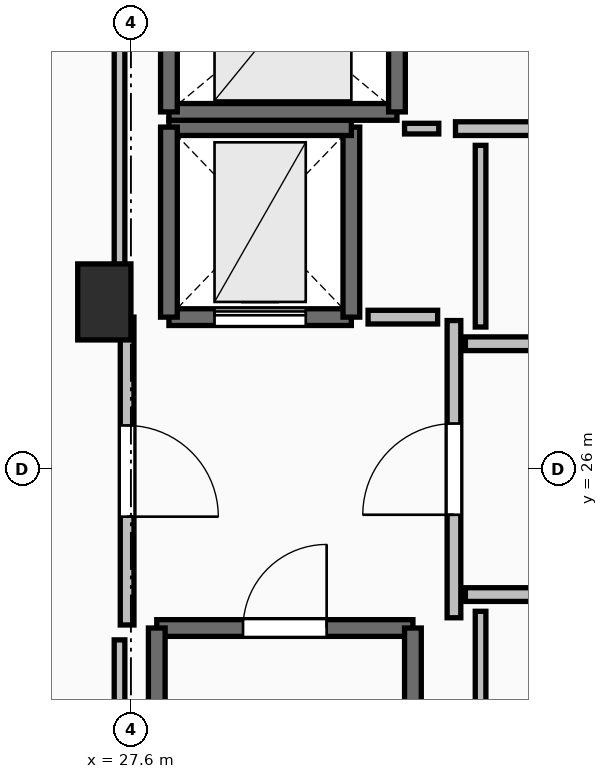
"""IFC4 building model, lengths in metres.
Left out: names, types, materials, properties, quantities, classifications, styles, units other than length and angle.
Written with IfcOpenShell. Run it as: python <this file> out.ifc"""

import sys

from ifc_helpers import new_model, si_unit, direction, frame, frame_2d, origin, origin_2d, place, context, subcontext, project, spatial, rectangle, extrude, element, fill, save


model = new_model("IFC4")
c1 = context("Model", 3, precision=1e-05, world=origin(), true_north=direction((0.0, 1.0)))
c2 = subcontext(c1, "Body", "Model", "MODEL_VIEW")
j1 = project(units=[si_unit("LENGTHUNIT", "METRE"), si_unit("PLANEANGLEUNIT", "RADIAN")], contexts=[c1])
p1 = place(None, origin())
s1 = spatial("IfcSite", under=j1, at=p1, CompositionType="ELEMENT")
p2 = place(p1, origin())
s2 = spatial("IfcBuilding", under=s1, at=p2, CompositionType="ELEMENT")
p3 = place(p2, frame((0.0, 0.0, 266.2)))
s3 = spatial("IfcBuildingStorey", under=s2, at=p3, CompositionType="ELEMENT", Elevation=266.2)
p4 = place(p3, frame((27.25, 28.2, 0.0), z_axis=(0.0, 0.0, 1.0), x_axis=(1.0, 0.0, 0.0)))
e1 = element("IfcColumn", 1, at=p4, inside=s3, PredefinedType="PILASTER", context=c2, shape_type="SweptSolid", body=[
    extrude(rectangle(XDim=0.7, YDim=1.0, at=origin_2d()), origin(), (0.0, 0.0, 1.0), 3.55),
])
p5 = place(p3, frame((27.94, 23.91, 0.0), z_axis=(0.0, 0.0, 1.0), x_axis=(1.0, 0.0, 0.0)))
e2 = element("IfcWall", 2, at=p5, inside=s3, PredefinedType="SOLIDWALL", context=c2, shape_type="SweptSolid", body=[
    extrude(rectangle(XDim=3.37, YDim=0.22, at=frame_2d((1.685, 0.0))), origin(), (0.0, 0.0, 1.0), 3.29),
])
p6 = place(p5, frame((1.135, 0.0, 0.0)))
e3 = element("IfcOpeningElement", 3, at=p6, cuts=e2, PredefinedType="OPENING", context=c2, shape_type="SweptSolid", body=[
    extrude(rectangle(XDim=1.1, YDim=2.15, at=frame_2d((0.55, 1.075))), frame((0.0, 0.125, 0.0), z_axis=(0.0, -1.0, 0.0), x_axis=(1.0, 0.0, 0.0)), (0.0, 0.0, 1.0), 0.25),
])
for number, where, z_axis, x_axis in (
    (4, (31.31, 23.91, 0.0), (0.0, 0.0, 1.0), (0.0, -1.0, 0.0)),
    (5, (27.94, 16.49, 0.0), (0.0, 0.0, 1.0), (0.0, 1.0, 0.0)),
):
    element("IfcWall", number, at=place(p3, frame(where, z_axis=z_axis, x_axis=x_axis)), inside=s3, PredefinedType="SOLIDWALL", context=c2, shape_type="SweptSolid", body=[
        extrude(rectangle(XDim=7.42, YDim=0.22, at=frame_2d((3.71, 0.0))), origin(), (0.0, 0.0, 1.0), 3.29),
    ])
p7 = place(p3, frame((28.1, 28.0, 0.0), z_axis=(0.0, 0.0, 1.0), x_axis=(1.0, 0.0, 0.0)))
e6 = element("IfcWall", 6, at=p7, inside=s3, PredefinedType="SHEAR", context=c2, shape_type="SweptSolid", body=[
    extrude(rectangle(XDim=2.4, YDim=0.22, at=frame_2d((1.2, 0.0))), origin(), (0.0, 0.0, 1.0), 3.29),
])
p8 = place(p7, frame((0.6, 0.0, 0.0)))
e7 = element("IfcOpeningElement", 7, at=p8, cuts=e6, PredefinedType="OPENING", context=c2, shape_type="SweptSolid", body=[
    extrude(rectangle(XDim=1.2, YDim=2.2, at=frame_2d((0.6, 1.1))), frame((0.0, 0.125, 0.0), z_axis=(0.0, -1.0, 0.0), x_axis=(1.0, 0.0, 0.0)), (0.0, 0.0, 1.0), 0.25),
])
p9 = place(p3, frame((30.5, 28.0, 0.0), z_axis=(0.0, 0.0, 1.0), x_axis=(0.0, 1.0, 0.0)))
e8 = element("IfcWall", 8, at=p9, inside=s3, PredefinedType="SHEAR", context=c2, shape_type="SweptSolid", body=[
    extrude(rectangle(XDim=2.5, YDim=0.22, at=frame_2d((1.25, 0.0))), origin(), (0.0, 0.0, 1.0), 3.29),
])
p10 = place(p3, frame((30.5, 30.5, 0.0), z_axis=(0.0, 0.0, 1.0), x_axis=(-1.0, 0.0, 0.0)))
e9 = element("IfcWall", 9, at=p10, inside=s3, PredefinedType="SHEAR", context=c2, shape_type="SweptSolid", body=[
    extrude(rectangle(XDim=2.4, YDim=0.22, at=frame_2d((1.2, 0.0))), origin(), (0.0, 0.0, 1.0), 3.29),
])
p11 = place(p3, frame((28.1, 30.5, 0.0), z_axis=(0.0, 0.0, 1.0), x_axis=(0.0, -1.0, 0.0)))
e10 = element("IfcWall", 10, at=p11, inside=s3, PredefinedType="SHEAR", context=c2, shape_type="SweptSolid", body=[
    extrude(rectangle(XDim=2.5, YDim=0.22, at=frame_2d((1.25, 0.0))), origin(), (0.0, 0.0, 1.0), 3.29),
])
p12 = place(p3, frame((28.1, 30.7, 0.0), z_axis=(0.0, 0.0, 1.0), x_axis=(1.0, 0.0, 0.0)))
e11 = element("IfcWall", 11, at=p12, inside=s3, PredefinedType="SOLIDWALL", context=c2, shape_type="SweptSolid", body=[
    extrude(rectangle(XDim=3.0, YDim=0.22, at=frame_2d((1.5, 0.0))), origin(), (0.0, 0.0, 1.0), 3.29),
])
for number, where, z_axis, x_axis in (
    (12, (31.1, 30.7, 0.0), (0.0, 0.0, 1.0), (0.0, 1.0, 0.0)),
    (13, (28.1, 33.2, 0.0), (0.0, 0.0, 1.0), (0.0, -1.0, 0.0)),
):
    element("IfcWall", number, at=place(p3, frame(where, z_axis=z_axis, x_axis=x_axis)), inside=s3, PredefinedType="SOLIDWALL", context=c2, shape_type="SweptSolid", body=[
        extrude(rectangle(XDim=2.5, YDim=0.22, at=frame_2d((1.25, 0.0))), origin(), (0.0, 0.0, 1.0), 3.29),
    ])
p13 = place(p3, frame((31.85, 24.045, 0.0), z_axis=(0.0, 0.0, 1.0), x_axis=(0.0, 1.0, 0.0)))
e14 = element("IfcWall", 14, at=p13, inside=s3, PredefinedType="PARTITIONING", context=c2, shape_type="SweptSolid", body=[
    extrude(rectangle(XDim=3.91, YDim=0.18, at=frame_2d((1.955, 0.0))), origin(), (0.0, 0.0, 1.0), 3.29),
])
p14 = place(p13, frame((1.355, 0.0, 0.0)))
e15 = element("IfcOpeningElement", 15, at=p14, cuts=e14, PredefinedType="OPENING", context=c2, shape_type="SweptSolid", body=[
    extrude(rectangle(XDim=1.2, YDim=2.15, at=frame_2d((0.6, 1.075))), frame((0.0, 0.105, 0.0), z_axis=(0.0, -1.0, 0.0), x_axis=(1.0, 0.0, 0.0)), (0.0, 0.0, 1.0), 0.21),
])
p15 = place(p3, frame((27.55, 28.0, 0.0), z_axis=(0.0, 0.0, 1.0), x_axis=(0.0, -1.0, 0.0)))
e16 = element("IfcWall", 16, at=p15, inside=s3, PredefinedType="PARTITIONING", context=c2, shape_type="SweptSolid", body=[
    extrude(rectangle(XDim=4.05, YDim=0.18, at=frame_2d((2.025, 0.0))), origin(), (0.0, 0.0, 1.0), 3.29),
])
p16 = place(p15, frame((1.425, 0.0, 0.0)))
e17 = element("IfcOpeningElement", 17, at=p16, cuts=e16, PredefinedType="OPENING", context=c2, shape_type="SweptSolid", body=[
    extrude(rectangle(XDim=1.2, YDim=2.15, at=frame_2d((0.6, 1.075))), frame((0.0, 0.105, 0.0), z_axis=(0.0, -1.0, 0.0), x_axis=(1.0, 0.0, 0.0)), (0.0, 0.0, 1.0), 0.21),
])
p17 = place(p3, frame((31.87, 30.48, 0.0), z_axis=(0.0, 0.0, 1.0), x_axis=(1.0, 0.0, 0.0)))
e18 = element("IfcWall", 18, at=p17, inside=s3, PredefinedType="PARTITIONING", context=c2, shape_type="SweptSolid", body=[
    extrude(rectangle(XDim=1.6, YDim=0.18, at=frame_2d((0.8, 0.0))), origin(), (0.0, 0.0, 1.0), 3.29),
])
p18 = place(p3, frame((39.19, 27.65, 0.0), z_axis=(0.0, 0.0, 1.0), x_axis=(-1.0, 0.0, 0.0)))
e19 = element("IfcWall", 19, at=p18, inside=s3, PredefinedType="PARTITIONING", context=c2, shape_type="SweptSolid", body=[
    extrude(rectangle(XDim=7.19, YDim=0.18, at=frame_2d((3.595, 0.0))), origin(), (0.0, 0.0, 1.0), 3.29),
])
p19 = place(p18, frame((3.095, 0.0, 0.0)))
e20 = element("IfcOpeningElement", 20, at=p19, cuts=e19, PredefinedType="OPENING", context=c2, shape_type="SweptSolid", body=[
    extrude(rectangle(XDim=1.0, YDim=2.15, at=frame_2d((0.5, 1.075))), frame((0.0, 0.105, 0.0), z_axis=(0.0, -1.0, 0.0), x_axis=(1.0, 0.0, 0.0)), (0.0, 0.0, 1.0), 0.21),
])
p20 = place(p3, frame((32.0, 24.35, 0.0), z_axis=(0.0, 0.0, 1.0), x_axis=(1.0, 0.0, 0.0)))
e21 = element("IfcWall", 21, at=p20, inside=s3, PredefinedType="PARTITIONING", context=c2, shape_type="SweptSolid", body=[
    extrude(rectangle(XDim=3.04, YDim=0.18, at=frame_2d((1.52, 0.0))), origin(), (0.0, 0.0, 1.0), 3.29),
])
p21 = place(p20, frame((1.095, 0.0, 0.0)))
e22 = element("IfcOpeningElement", 22, at=p21, cuts=e21, PredefinedType="OPENING", context=c2, shape_type="SweptSolid", body=[
    extrude(rectangle(XDim=0.85, YDim=2.1, at=frame_2d((0.425, 1.05))), frame((0.0, 0.105, 0.0), z_axis=(0.0, -1.0, 0.0), x_axis=(1.0, 0.0, 0.0)), (0.0, 0.0, 1.0), 0.21),
])
p22 = place(p3, frame((31.635, 28.0, 0.0), z_axis=(0.0, 0.0, 1.0), x_axis=(-1.0, 0.0, 0.0)))
e23 = element("IfcWall", 23, at=p22, inside=s3, PredefinedType="PARTITIONING", context=c2, shape_type="SweptSolid", body=[
    extrude(rectangle(XDim=0.915, YDim=0.18, at=frame_2d((0.458, 0.0))), origin(), (0.0, 0.0, 1.0), 3.29),
])
p23 = place(p3, frame((31.2, 30.48, 0.0), z_axis=(0.0, 0.0, 1.0), x_axis=(1.0, 0.0, 0.0)))
e24 = element("IfcWall", 24, at=p23, inside=s3, PredefinedType="PARTITIONING", context=c2, shape_type="SweptSolid", body=[
    extrude(rectangle(XDim=0.45, YDim=0.14, at=frame_2d((0.225, 0.0))), origin(), (0.0, 0.0, 1.0), 3.29),
])
p24 = place(p3, frame((32.2, 30.26, 0.0), z_axis=(0.0, 0.0, 1.0), x_axis=(0.0, -1.0, 0.0)))
e25 = element("IfcWall", 25, at=p24, inside=s3, PredefinedType="PARTITIONING", context=c2, shape_type="SweptSolid", body=[
    extrude(rectangle(XDim=2.39, YDim=0.14, at=frame_2d((1.195, 0.0))), origin(), (0.0, 0.0, 1.0), 3.29),
])
p25 = place(p3, frame((32.2, 24.13, 0.0), z_axis=(0.0, 0.0, 1.0), x_axis=(0.0, -1.0, 0.0)))
e26 = element("IfcWall", 26, at=p25, inside=s3, PredefinedType="PARTITIONING", context=c2, shape_type="SweptSolid", body=[
    extrude(rectangle(XDim=2.46, YDim=0.14, at=frame_2d((1.23, 0.0))), origin(), (0.0, 0.0, 1.0), 2.482),
])
p26 = place(p3, frame((27.45, 33.45, 0.0), z_axis=(0.0, 0.0, 1.0), x_axis=(0.0, -1.0, 0.0)))
e27 = element("IfcWall", 27, at=p26, inside=s3, PredefinedType="PARTITIONING", context=c2, shape_type="SweptSolid", body=[
    extrude(rectangle(XDim=5.254, YDim=0.14, at=frame_2d((2.627, 0.0))), origin(), (0.0, 0.0, 1.0), 2.482),
])
p27 = place(p3, frame((27.45, 23.754, 0.0), z_axis=(0.0, 0.0, 1.0), x_axis=(0.0, -1.0, 0.0)))
e28 = element("IfcWall", 28, at=p27, inside=s3, PredefinedType="PARTITIONING", context=c2, shape_type="SweptSolid", body=[
    extrude(rectangle(XDim=7.514, YDim=0.14, at=frame_2d((3.757, 0.0))), origin(), (0.0, 0.0, 1.0), 2.482),
])
p28 = place(p6, origin())
e29 = element("IfcDoor", 29, at=p28, inside=s3, OperationType="SINGLE_SWING_RIGHT", PredefinedType="DOOR", context=c2, shape_type="SweptSolid", body=[
    extrude(rectangle(XDim=1.1, YDim=2.15, at=frame_2d((0.55, 1.075))), frame((0.0, 0.025, 0.0), z_axis=(0.0, -1.0, 0.0), x_axis=(1.0, 0.0, 0.0)), (0.0, 0.0, 1.0), 0.05),
])
fill(e3, e29)
p29 = place(p8, origin())
e30 = element("IfcDoor", 30, at=p29, inside=s3, OperationType="SLIDING_TO_LEFT", PredefinedType="DOOR", context=c2, shape_type="SweptSolid", body=[
    extrude(rectangle(XDim=1.2, YDim=2.2, at=frame_2d((0.6, 1.1))), frame((0.0, 0.025, 0.0), z_axis=(0.0, -1.0, 0.0), x_axis=(1.0, 0.0, 0.0)), (0.0, 0.0, 1.0), 0.05),
])
fill(e7, e30)
p30 = place(p14, origin())
e31 = element("IfcDoor", 31, at=p30, inside=s3, OperationType="SINGLE_SWING_LEFT", PredefinedType="DOOR", context=c2, shape_type="SweptSolid", body=[
    extrude(rectangle(XDim=1.2, YDim=2.15, at=frame_2d((0.6, 1.075))), frame((0.0, 0.025, 0.0), z_axis=(0.0, -1.0, 0.0), x_axis=(1.0, 0.0, 0.0)), (0.0, 0.0, 1.0), 0.05),
])
fill(e15, e31)
p31 = place(p16, origin())
e32 = element("IfcDoor", 32, at=p31, inside=s3, OperationType="SINGLE_SWING_RIGHT", PredefinedType="DOOR", context=c2, shape_type="SweptSolid", body=[
    extrude(rectangle(XDim=1.2, YDim=2.15, at=frame_2d((0.6, 1.075))), frame((0.0, 0.025, 0.0), z_axis=(0.0, -1.0, 0.0), x_axis=(1.0, 0.0, 0.0)), (0.0, 0.0, 1.0), 0.05),
])
fill(e17, e32)
save(model, sys.argv[1])
